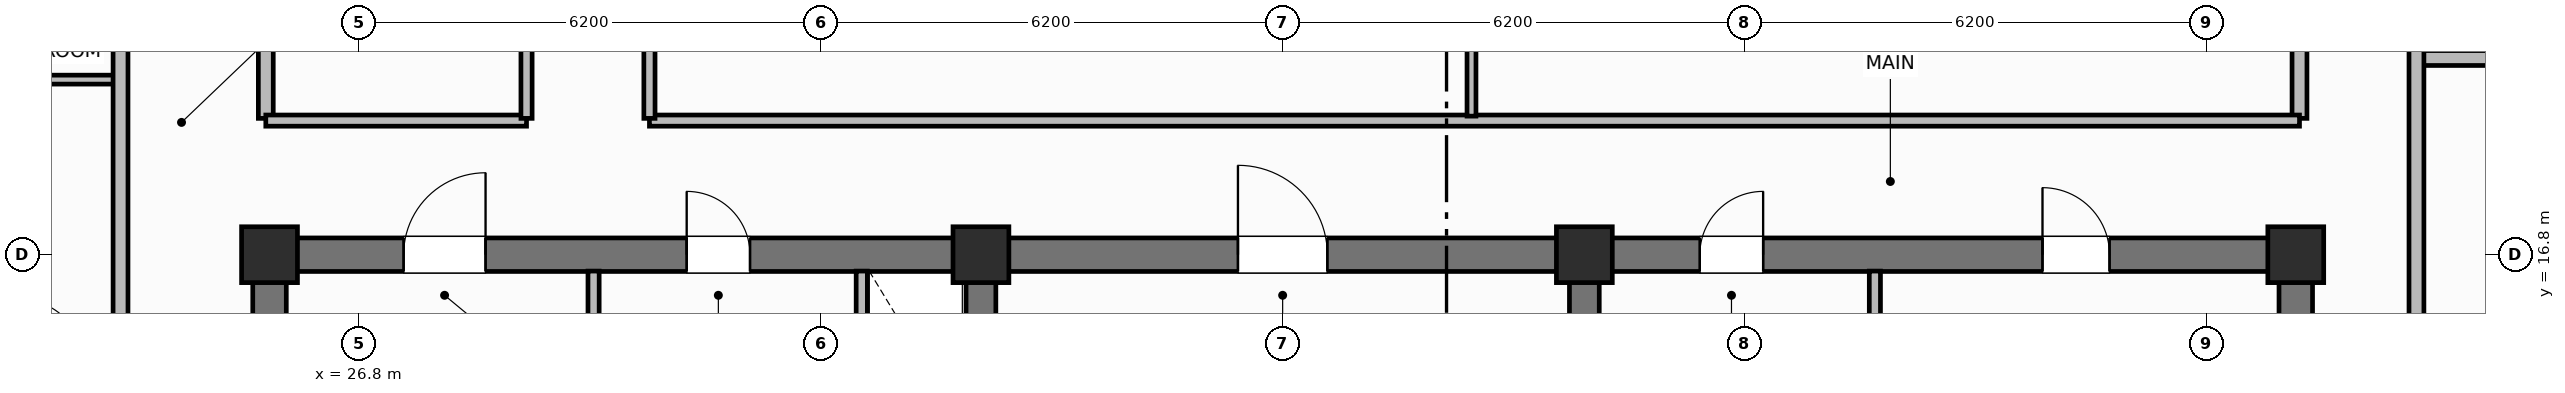
"""IFC4 building model, lengths in metres.
Left out: names, types, materials, properties, quantities, classifications, styles, units other than length and angle.
Written with IfcOpenShell. Run it as: python <this file> out.ifc"""

import sys

from ifc_helpers import new_model, si_unit, direction, frame, frame_2d, origin, origin_2d, place, context, subcontext, project, spatial, rectangle, extrude, element, fill, save


model = new_model("IFC4")
c1 = context("Model", 3, precision=1e-05, world=origin(), true_north=direction((0.0, 1.0)))
c2 = subcontext(c1, "Body", "Model", "MODEL_VIEW")
j1 = project(units=[si_unit("LENGTHUNIT", "METRE"), si_unit("PLANEANGLEUNIT", "RADIAN")], contexts=[c1])
p1 = place(None, origin())
s1 = spatial("IfcSite", under=j1, at=p1, CompositionType="ELEMENT")
p2 = place(p1, origin())
s2 = spatial("IfcBuilding", under=s1, at=p2, CompositionType="ELEMENT")
p3 = place(p2, frame((0.0, 0.0, 278.7)))
s3 = spatial("IfcBuildingStorey", under=s2, at=p3, CompositionType="ELEMENT", Elevation=278.7)
for number, where, z_axis, x_axis in (
    (1, (25.6, 10.825, 0.0), (0.0, 0.0, 1.0), (0.0, 1.0, 0.0)),
    (2, (52.8, 10.825, 0.0), (0.0, 0.0, 1.0), (0.0, 1.0, 0.0)),
):
    element("IfcWall", number, at=place(p3, frame(where, z_axis=z_axis, x_axis=x_axis)), inside=s3, PredefinedType="SHEAR", context=c2, shape_type="SweptSolid", body=[
        extrude(rectangle(XDim=5.75, YDim=0.45, at=frame_2d((2.875, 0.0))), origin(), (0.0, 0.0, 1.0), 3.7),
    ])
p4 = place(p3, frame((25.6, 16.8, 0.0), z_axis=(0.0, 0.0, 1.0), x_axis=(1.0, 0.0, 0.0)))
e3 = element("IfcWall", 3, at=p4, inside=s3, PredefinedType="SHEAR", context=c2, shape_type="SweptSolid", body=[
    extrude(rectangle(XDim=27.2, YDim=0.45, at=frame_2d((13.6, 0.0))), origin(), (0.0, 0.0, 1.0), 3.7),
])
p5 = place(p4, frame((1.8, 0.0, 0.0)))
e4 = element("IfcOpeningElement", 4, at=p5, cuts=e3, PredefinedType="OPENING", context=c2, shape_type="SweptSolid", body=[
    extrude(rectangle(XDim=1.1, YDim=2.15, at=frame_2d((0.55, 1.075))), frame((0.0, 0.235, 0.0), z_axis=(0.0, -1.0, 0.0), x_axis=(1.0, 0.0, 0.0)), (0.0, 0.0, 1.0), 0.47),
])
p6 = place(p4, frame((5.6, 0.0, 0.0)))
e5 = element("IfcOpeningElement", 5, at=p6, cuts=e3, PredefinedType="OPENING", context=c2, shape_type="SweptSolid", body=[
    extrude(rectangle(XDim=0.85, YDim=2.1, at=frame_2d((0.425, 1.05))), frame((0.0, 0.235, 0.0), z_axis=(0.0, -1.0, 0.0), x_axis=(1.0, 0.0, 0.0)), (0.0, 0.0, 1.0), 0.47),
])
p7 = place(p4, frame((13.0, 0.0, 0.0)))
e6 = element("IfcOpeningElement", 6, at=p7, cuts=e3, PredefinedType="OPENING", context=c2, shape_type="SweptSolid", body=[
    extrude(rectangle(XDim=1.2, YDim=2.15, at=frame_2d((0.6, 1.075))), frame((0.0, 0.235, 0.0), z_axis=(0.0, -1.0, 0.0), x_axis=(1.0, 0.0, 0.0)), (0.0, 0.0, 1.0), 0.47),
])
p8 = place(p4, frame((19.2, 0.0, 0.0)))
e7 = element("IfcOpeningElement", 7, at=p8, cuts=e3, PredefinedType="OPENING", context=c2, shape_type="SweptSolid", body=[
    extrude(rectangle(XDim=0.85, YDim=2.1, at=frame_2d((0.425, 1.05))), frame((0.0, 0.235, 0.0), z_axis=(0.0, -1.0, 0.0), x_axis=(1.0, 0.0, 0.0)), (0.0, 0.0, 1.0), 0.47),
])
p9 = place(p4, frame((23.8, 0.0, 0.0)))
e8 = element("IfcOpeningElement", 8, at=p9, cuts=e3, PredefinedType="OPENING", context=c2, shape_type="SweptSolid", body=[
    extrude(rectangle(XDim=0.9, YDim=2.1, at=frame_2d((0.45, 1.05))), frame((0.0, 0.235, 0.0), z_axis=(0.0, -1.0, 0.0), x_axis=(1.0, 0.0, 0.0)), (0.0, 0.0, 1.0), 0.47),
])
for number, where, z_axis, x_axis in (
    (9, (35.15, 10.825, 0.0), (0.0, 0.0, 1.0), (0.0, 1.0, 0.0)),
    (10, (43.25, 10.825, 0.0), (0.0, 0.0, 1.0), (0.0, 1.0, 0.0)),
):
    element("IfcWall", number, at=place(p3, frame(where, z_axis=z_axis, x_axis=x_axis)), inside=s3, PredefinedType="SHEAR", context=c2, shape_type="SweptSolid", body=[
        extrude(rectangle(XDim=5.75, YDim=0.4, at=frame_2d((2.875, 0.0))), origin(), (0.0, 0.0, 1.0), 3.7),
    ])
for number, where, z_axis, x_axis in (
    (11, (25.6, 16.8, 0.0), (0.0, 0.0, 1.0), (1.0, 0.0, 0.0)),
    (12, (35.15, 16.8, 0.0), (0.0, 0.0, 1.0), (1.0, 0.0, 0.0)),
    (13, (43.25, 16.8, 0.0), (0.0, 0.0, 1.0), (1.0, 0.0, 0.0)),
    (14, (52.8, 16.8, 0.0), (0.0, 0.0, 1.0), (1.0, 0.0, 0.0)),
):
    element("IfcColumn", number, at=place(p3, frame(where, z_axis=z_axis, x_axis=x_axis)), inside=s3, PredefinedType="COLUMN", context=c2, shape_type="SweptSolid", body=[
        extrude(rectangle(XDim=0.75, YDim=0.75, at=origin_2d()), origin(), (0.0, 0.0, 1.0), 3.7),
    ])
p10 = place(p3, frame((29.95, 14.5, 0.0), z_axis=(0.0, 0.0, 1.0), x_axis=(0.0, 1.0, 0.0)))
e15 = element("IfcWall", 15, at=p10, inside=s3, PredefinedType="PARTITIONING", context=c2, shape_type="SweptSolid", body=[
    extrude(rectangle(XDim=2.08, YDim=0.15, at=frame_2d((1.04, 0.0))), origin(), (0.0, 0.0, 1.0), 2.56),
])
p11 = place(p3, frame((33.55, 14.5, 0.0), z_axis=(0.0, 0.0, 1.0), x_axis=(0.0, 1.0, 0.0)))
e16 = element("IfcWall", 16, at=p11, inside=s3, PredefinedType="PARTITIONING", context=c2, shape_type="SweptSolid", body=[
    extrude(rectangle(XDim=2.08, YDim=0.15, at=frame_2d((1.04, 0.0))), origin(), (0.0, 0.0, 1.0), 2.56),
])
p12 = place(p11, frame((0.55, 0.0, 0.0)))
e17 = element("IfcOpeningElement", 17, at=p12, cuts=e16, PredefinedType="OPENING", context=c2, shape_type="SweptSolid", body=[
    extrude(rectangle(XDim=0.85, YDim=2.05, at=frame_2d((0.425, 1.025))), frame((0.0, 0.085, 0.0), z_axis=(0.0, -1.0, 0.0), x_axis=(1.0, 0.0, 0.0)), (0.0, 0.0, 1.0), 0.17),
])
p13 = place(p3, frame((47.15, 10.95, 0.0), z_axis=(0.0, 0.0, 1.0), x_axis=(0.0, 1.0, 0.0)))
e18 = element("IfcWall", 18, at=p13, inside=s3, PredefinedType="PARTITIONING", context=c2, shape_type="SweptSolid", body=[
    extrude(rectangle(XDim=5.63, YDim=0.15, at=frame_2d((2.815, 0.0))), origin(), (0.0, 0.0, 1.0), 2.56),
])
for number, where, z_axis, x_axis in (
    (19, (25.55, 18.63, 0.0), (0.0, 0.0, 1.0), (0.0, 1.0, 0.0)),
    (20, (52.85, 18.63, 0.0), (0.0, 0.0, 1.0), (0.0, 1.0, 0.0)),
):
    element("IfcWall", number, at=place(p3, frame(where, z_axis=z_axis, x_axis=x_axis)), inside=s3, PredefinedType="PARTITIONING", context=c2, shape_type="SweptSolid", body=[
        extrude(rectangle(XDim=19.14, YDim=0.2, at=frame_2d((9.57, 0.0))), origin(), (0.0, 0.0, 1.0), 2.56),
    ])
p14 = place(p3, frame((25.55, 18.6, 0.0), z_axis=(0.0, 0.0, 1.0), x_axis=(1.0, 0.0, 0.0)))
e21 = element("IfcWall", 21, at=p14, inside=s3, PredefinedType="PARTITIONING", context=c2, shape_type="SweptSolid", body=[
    extrude(rectangle(XDim=3.5, YDim=0.15, at=frame_2d((1.75, 0.0))), origin(), (0.0, 0.0, 1.0), 2.56),
])
p15 = place(p3, frame((30.7, 18.6, 0.0), z_axis=(0.0, 0.0, 1.0), x_axis=(1.0, 0.0, 0.0)))
e22 = element("IfcWall", 22, at=p15, inside=s3, PredefinedType="PARTITIONING", context=c2, shape_type="SweptSolid", body=[
    extrude(rectangle(XDim=22.15, YDim=0.15, at=frame_2d((11.075, 0.0))), origin(), (0.0, 0.0, 1.0), 2.56),
])
p16 = place(p3, frame((41.735, 18.66, 0.0), z_axis=(0.0, 0.0, 1.0), x_axis=(0.0, 1.0, 0.0)))
e23 = element("IfcWall", 23, at=p16, inside=s3, PredefinedType="PARTITIONING", context=c2, shape_type="SweptSolid", body=[
    extrude(rectangle(XDim=10.648, YDim=0.12, at=frame_2d((5.324, 0.0))), origin(), (0.0, 0.0, 1.0), 2.56),
])
p17 = place(p16, frame((2.0, 0.0, 0.0)))
e24 = element("IfcOpeningElement", 24, at=p17, cuts=e23, PredefinedType="OPENING", context=c2, shape_type="SweptSolid", body=[
    extrude(rectangle(XDim=0.9, YDim=2.1, at=frame_2d((0.45, 1.05))), frame((0.0, 0.07, 0.0), z_axis=(0.0, -1.0, 0.0), x_axis=(1.0, 0.0, 0.0)), (0.0, 0.0, 1.0), 0.14),
])
p18 = place(p3, frame((29.05, 18.63, 0.0), z_axis=(0.0, 0.0, 1.0), x_axis=(0.0, 1.0, 0.0)))
e25 = element("IfcWall", 25, at=p18, inside=s3, PredefinedType="PARTITIONING", context=c2, shape_type="SweptSolid", body=[
    extrude(rectangle(XDim=19.14, YDim=0.15, at=frame_2d((9.57, 0.0))), origin(), (0.0, 0.0, 1.0), 2.56),
])
p19 = place(p18, frame((5.5, 0.0, 0.0)))
e26 = element("IfcOpeningElement", 26, at=p19, cuts=e25, PredefinedType="OPENING", context=c2, shape_type="SweptSolid", body=[
    extrude(rectangle(XDim=1.0, YDim=2.15, at=frame_2d((0.5, 1.075))), frame((0.0, 0.085, 0.0), z_axis=(0.0, -1.0, 0.0), x_axis=(1.0, 0.0, 0.0)), (0.0, 0.0, 1.0), 0.17),
])
p20 = place(p3, frame((30.7, 18.63, 0.0), z_axis=(0.0, 0.0, 1.0), x_axis=(0.0, 1.0, 0.0)))
e27 = element("IfcWall", 27, at=p20, inside=s3, PredefinedType="PARTITIONING", context=c2, shape_type="SweptSolid", body=[
    extrude(rectangle(XDim=19.14, YDim=0.15, at=frame_2d((9.57, 0.0))), origin(), (0.0, 0.0, 1.0), 2.56),
])
p21 = place(p20, frame((2.2, 0.0, 0.0)))
e28 = element("IfcOpeningElement", 28, at=p21, cuts=e27, PredefinedType="OPENING", context=c2, shape_type="SweptSolid", body=[
    extrude(rectangle(XDim=1.0, YDim=2.15, at=frame_2d((0.5, 1.075))), frame((0.0, 0.085, 0.0), z_axis=(0.0, -1.0, 0.0), x_axis=(1.0, 0.0, 0.0)), (0.0, 0.0, 1.0), 0.17),
])
p22 = place(p20, frame((12.719, 0.0, 0.0)))
e29 = element("IfcOpeningElement", 29, at=p22, cuts=e27, PredefinedType="OPENING", context=c2, shape_type="SweptSolid", body=[
    extrude(rectangle(XDim=1.0, YDim=2.15, at=frame_2d((0.5, 1.075))), frame((0.0, 0.085, 0.0), z_axis=(0.0, -1.0, 0.0), x_axis=(1.0, 0.0, 0.0)), (0.0, 0.0, 1.0), 0.17),
])
p23 = place(p3, frame((21.65, 19.15, 0.0), z_axis=(0.0, 0.0, 1.0), x_axis=(1.0, 0.0, 0.0)))
e30 = element("IfcWall", 30, at=p23, inside=s3, PredefinedType="PARTITIONING", context=c2, shape_type="SweptSolid", body=[
    extrude(rectangle(XDim=1.95, YDim=0.12, at=frame_2d((0.975, 0.0))), origin(), (0.0, 0.0, 1.0), 2.56),
])
p24 = place(p3, frame((23.6, 9.95, 0.0), z_axis=(0.0, 0.0, 1.0), x_axis=(0.0, 1.0, 0.0)))
e31 = element("IfcWall", 31, at=p24, inside=s3, PredefinedType="PARTITIONING", context=c2, shape_type="SweptSolid", body=[
    extrude(rectangle(XDim=36.5, YDim=0.2, at=frame_2d((18.25, 0.0))), origin(), (0.0, 0.0, 1.0), 2.56),
])
p25 = place(p24, frame((3.25, 0.0, 0.0)))
e32 = element("IfcOpeningElement", 32, at=p25, cuts=e31, PredefinedType="OPENING", context=c2, shape_type="SweptSolid", body=[
    extrude(rectangle(XDim=1.0, YDim=2.15, at=frame_2d((0.5, 1.075))), frame((0.0, 0.11, 0.0), z_axis=(0.0, -1.0, 0.0), x_axis=(1.0, 0.0, 0.0)), (0.0, 0.0, 1.0), 0.22),
])
p26 = place(p3, frame((54.42, 19.44, 0.0), z_axis=(0.0, 0.0, 1.0), x_axis=(1.0, 0.0, 0.0)))
e33 = element("IfcWall", 33, at=p26, inside=s3, PredefinedType="PARTITIONING", context=c2, shape_type="SweptSolid", body=[
    extrude(rectangle(XDim=4.45, YDim=0.2, at=frame_2d((2.225, 0.0))), origin(), (0.0, 0.0, 1.0), 2.56),
])
p27 = place(p3, frame((54.42, 9.95, 0.0), z_axis=(0.0, 0.0, 1.0), x_axis=(0.0, 1.0, 0.0)))
e34 = element("IfcWall", 34, at=p27, inside=s3, PredefinedType="PARTITIONING", context=c2, shape_type="SweptSolid", body=[
    extrude(rectangle(XDim=36.5, YDim=0.2, at=frame_2d((18.25, 0.0))), origin(), (0.0, 0.0, 1.0), 2.56),
])
p28 = place(p27, frame((3.11, 0.0, 0.0)))
e35 = element("IfcOpeningElement", 35, at=p28, cuts=e34, PredefinedType="OPENING", context=c2, shape_type="SweptSolid", body=[
    extrude(rectangle(XDim=1.0, YDim=2.15, at=frame_2d((0.5, 1.075))), frame((0.0, 0.11, 0.0), z_axis=(0.0, -1.0, 0.0), x_axis=(1.0, 0.0, 0.0)), (0.0, 0.0, 1.0), 0.22),
])
p29 = place(p27, frame((11.99, 0.0, 0.0)))
e36 = element("IfcOpeningElement", 36, at=p29, cuts=e34, PredefinedType="OPENING", context=c2, shape_type="SweptSolid", body=[
    extrude(rectangle(XDim=1.0, YDim=2.15, at=frame_2d((0.5, 1.075))), frame((0.0, 0.11, 0.0), z_axis=(0.0, -1.0, 0.0), x_axis=(1.0, 0.0, 0.0)), (0.0, 0.0, 1.0), 0.22),
])
p30 = place(p27, frame((23.5, 0.0, 0.0)))
e37 = element("IfcOpeningElement", 37, at=p30, cuts=e34, PredefinedType="OPENING", context=c2, shape_type="SweptSolid", body=[
    extrude(rectangle(XDim=1.0, YDim=2.15, at=frame_2d((0.5, 1.075))), frame((0.0, 0.11, 0.0), z_axis=(0.0, -1.0, 0.0), x_axis=(1.0, 0.0, 0.0)), (0.0, 0.0, 1.0), 0.22),
])
p31 = place(p27, frame((31.2, 0.0, 0.0)))
e38 = element("IfcOpeningElement", 38, at=p31, cuts=e34, PredefinedType="OPENING", context=c2, shape_type="SweptSolid", body=[
    extrude(rectangle(XDim=1.0, YDim=2.15, at=frame_2d((0.5, 1.075))), frame((0.0, 0.11, 0.0), z_axis=(0.0, -1.0, 0.0), x_axis=(1.0, 0.0, 0.0)), (0.0, 0.0, 1.0), 0.22),
])
p32 = place(p5, origin())
e39 = element("IfcDoor", 39, at=p32, inside=s3, OperationType="SINGLE_SWING_RIGHT", PredefinedType="DOOR", context=c2, shape_type="SweptSolid", body=[
    extrude(rectangle(XDim=1.1, YDim=2.15, at=frame_2d((0.55, 1.075))), frame((0.0, 0.025, 0.0), z_axis=(0.0, -1.0, 0.0), x_axis=(1.0, 0.0, 0.0)), (0.0, 0.0, 1.0), 0.05),
])
fill(e4, e39)
p33 = place(p6, origin())
e40 = element("IfcDoor", 40, at=p33, inside=s3, OperationType="SINGLE_SWING_LEFT", PredefinedType="DOOR", context=c2, shape_type="SweptSolid", body=[
    extrude(rectangle(XDim=0.85, YDim=2.1, at=frame_2d((0.425, 1.05))), frame((0.0, 0.025, 0.0), z_axis=(0.0, -1.0, 0.0), x_axis=(1.0, 0.0, 0.0)), (0.0, 0.0, 1.0), 0.05),
])
fill(e5, e40)
p34 = place(p7, origin())
e41 = element("IfcDoor", 41, at=p34, inside=s3, OperationType="SINGLE_SWING_LEFT", PredefinedType="DOOR", context=c2, shape_type="SweptSolid", body=[
    extrude(rectangle(XDim=1.2, YDim=2.15, at=frame_2d((0.6, 1.075))), frame((0.0, 0.025, 0.0), z_axis=(0.0, -1.0, 0.0), x_axis=(1.0, 0.0, 0.0)), (0.0, 0.0, 1.0), 0.05),
])
fill(e6, e41)
p35 = place(p8, origin())
e42 = element("IfcDoor", 42, at=p35, inside=s3, OperationType="SINGLE_SWING_RIGHT", PredefinedType="DOOR", context=c2, shape_type="SweptSolid", body=[
    extrude(rectangle(XDim=0.85, YDim=2.1, at=frame_2d((0.425, 1.05))), frame((0.0, 0.025, 0.0), z_axis=(0.0, -1.0, 0.0), x_axis=(1.0, 0.0, 0.0)), (0.0, 0.0, 1.0), 0.05),
])
fill(e7, e42)
p36 = place(p9, origin())
e43 = element("IfcDoor", 43, at=p36, inside=s3, OperationType="SINGLE_SWING_LEFT", PredefinedType="DOOR", context=c2, shape_type="SweptSolid", body=[
    extrude(rectangle(XDim=0.9, YDim=2.1, at=frame_2d((0.45, 1.05))), frame((0.0, 0.025, 0.0), z_axis=(0.0, -1.0, 0.0), x_axis=(1.0, 0.0, 0.0)), (0.0, 0.0, 1.0), 0.05),
])
fill(e8, e43)
save(model, sys.argv[1])
